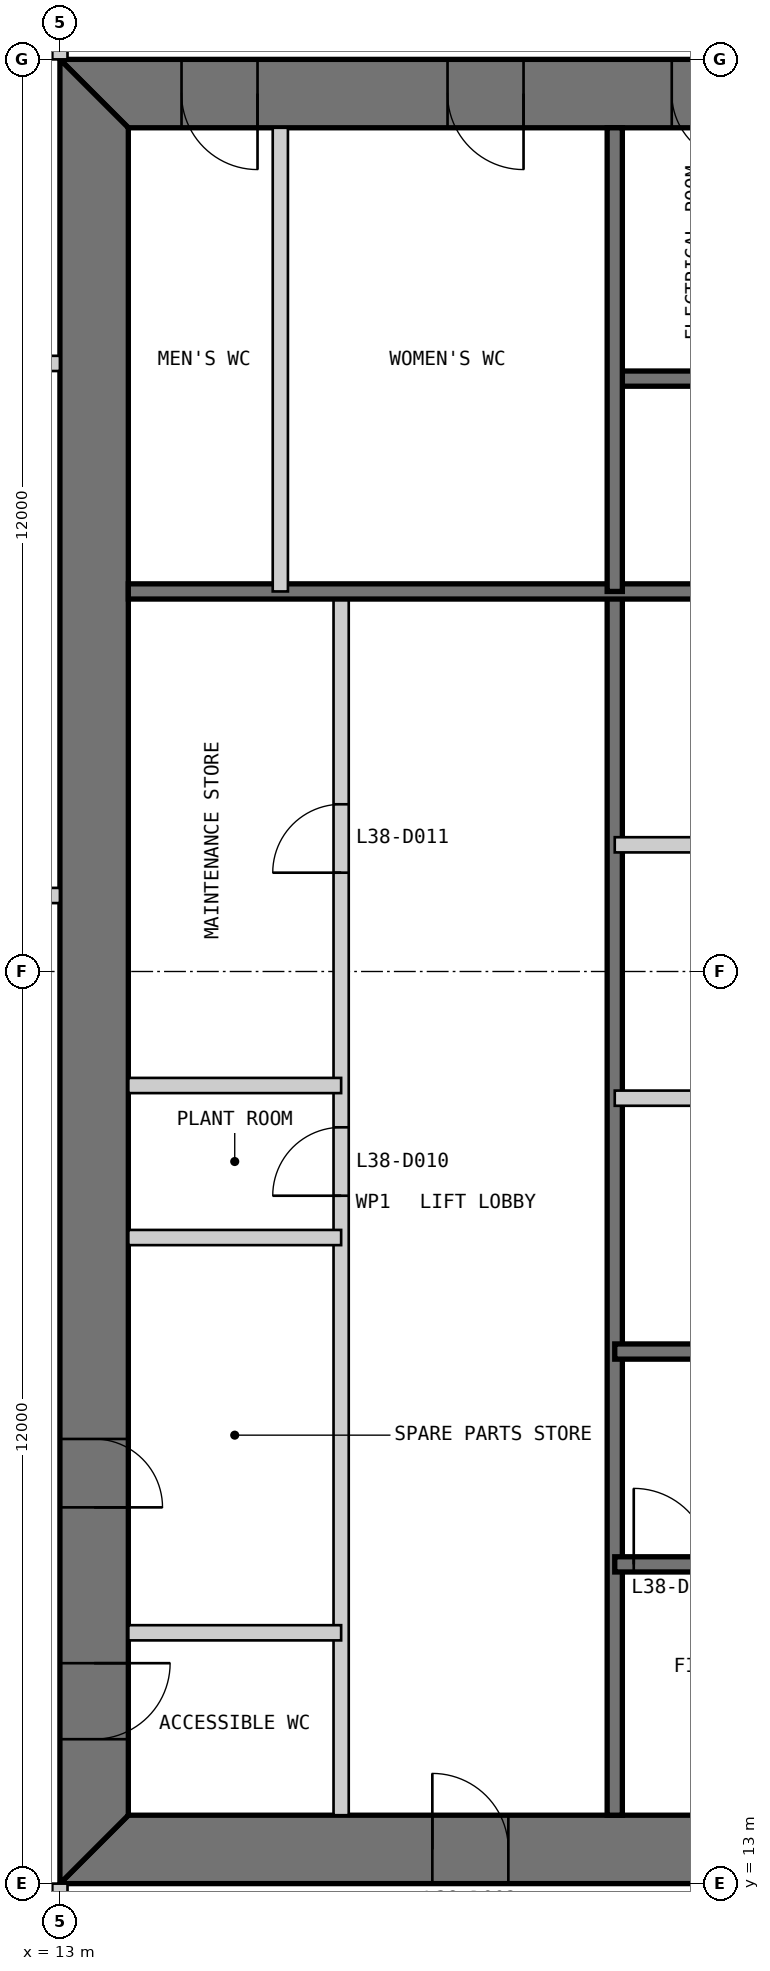
"""IFC4 building model, lengths in metres.
Left out: names, types, materials, properties, quantities, classifications, styles, units other than length and angle.
Written with IfcOpenShell. Run it as: python <this file> out.ifc"""

import sys

from ifc_helpers import new_model, si_unit, direction, frame, frame_2d, origin, place, context, subcontext, project, spatial, polyline, rectangle, outline, extrude, element, fill, save


model = new_model("IFC4")
c1 = context("Model", 3, precision=1e-05, world=origin(), true_north=direction((0.0, 1.0)))
c2 = subcontext(c1, "Body", "Model", "MODEL_VIEW")
j1 = project(units=[si_unit("LENGTHUNIT", "METRE"), si_unit("PLANEANGLEUNIT", "RADIAN")], contexts=[c1])
p1 = place(None, origin())
s1 = spatial("IfcSite", under=j1, at=p1, CompositionType="ELEMENT")
p2 = place(p1, origin())
s2 = spatial("IfcBuilding", under=s1, at=p2, CompositionType="ELEMENT")
p3 = place(p2, frame((0.0, 0.0, 162.4)))
s3 = spatial("IfcBuildingStorey", under=s2, at=p3, CompositionType="ELEMENT", Elevation=162.4)
p4 = place(p3, frame((13.0, 13.45, 0.0), z_axis=(0.0, 0.0, 1.0), x_axis=(1.0, 0.0, 0.0)))
e1 = element("IfcWall", 1, at=p4, inside=s3, PredefinedType="SHEAR", context=c2, shape_type="SweptSolid", body=[
    extrude(outline(polyline([(0.0, -0.45), (24.0, -0.45), (23.1, 0.45), (0.9, 0.45), (0.0, -0.45)])), origin(), (0.0, 0.0, 1.0), 6.0),
])
p5 = place(p4, frame((4.9, 0.0, 0.0)))
e2 = element("IfcOpeningElement", 2, at=p5, cuts=e1, PredefinedType="OPENING", context=c2, shape_type="SweptSolid", body=[
    extrude(rectangle(XDim=1.0, YDim=2.2, at=frame_2d((0.5, 1.1))), frame((0.0, 0.46, 0.0), z_axis=(0.0, -1.0, 0.0), x_axis=(1.0, 0.0, 0.0)), (0.0, 0.0, 1.0), 0.92),
])
p6 = place(p4, frame((8.9, 0.0, 0.0)))
e3 = element("IfcOpeningElement", 3, at=p6, cuts=e1, PredefinedType="OPENING", context=c2, shape_type="SweptSolid", body=[
    extrude(rectangle(XDim=1.1, YDim=2.2, at=frame_2d((0.55, 1.1))), frame((0.0, 0.46, 0.0), z_axis=(0.0, -1.0, 0.0), x_axis=(1.0, 0.0, 0.0)), (0.0, 0.0, 1.0), 0.92),
])
p7 = place(p4, frame((15.05, 0.0, 0.0)))
e4 = element("IfcOpeningElement", 4, at=p7, cuts=e1, PredefinedType="OPENING", context=c2, shape_type="SweptSolid", body=[
    extrude(rectangle(XDim=0.9, YDim=2.2, at=frame_2d((0.45, 1.1))), frame((0.0, 0.46, 0.0), z_axis=(0.0, -1.0, 0.0), x_axis=(1.0, 0.0, 0.0)), (0.0, 0.0, 1.0), 0.92),
])
p8 = place(p4, frame((17.9, 0.0, 0.0)))
e5 = element("IfcOpeningElement", 5, at=p8, cuts=e1, PredefinedType="OPENING", context=c2, shape_type="SweptSolid", body=[
    extrude(rectangle(XDim=1.0, YDim=2.2, at=frame_2d((0.5, 1.1))), frame((0.0, 0.46, 0.0), z_axis=(0.0, -1.0, 0.0), x_axis=(1.0, 0.0, 0.0)), (0.0, 0.0, 1.0), 0.92),
])
p9 = place(p4, frame((21.4, 0.0, 0.0)))
e6 = element("IfcOpeningElement", 6, at=p9, cuts=e1, PredefinedType="OPENING", context=c2, shape_type="SweptSolid", body=[
    extrude(rectangle(XDim=1.0, YDim=2.2, at=frame_2d((0.5, 1.1))), frame((0.0, 0.46, 0.0), z_axis=(0.0, -1.0, 0.0), x_axis=(1.0, 0.0, 0.0)), (0.0, 0.0, 1.0), 0.92),
])
p10 = place(p3, frame((37.0, 36.55, 0.0), z_axis=(0.0, 0.0, 1.0), x_axis=(-1.0, 0.0, 0.0)))
e7 = element("IfcWall", 7, at=p10, inside=s3, PredefinedType="SHEAR", context=c2, shape_type="SweptSolid", body=[
    extrude(outline(polyline([(0.0, -0.45), (24.0, -0.45), (23.1, 0.45), (0.9, 0.45), (0.0, -0.45)])), origin(), (0.0, 0.0, 1.0), 6.0),
])
p11 = place(p10, frame((4.9, 0.0, 0.0)))
e8 = element("IfcOpeningElement", 8, at=p11, cuts=e7, PredefinedType="OPENING", context=c2, shape_type="SweptSolid", body=[
    extrude(rectangle(XDim=1.0, YDim=2.2, at=frame_2d((0.5, 1.1))), frame((0.0, 0.46, 0.0), z_axis=(0.0, -1.0, 0.0), x_axis=(1.0, 0.0, 0.0)), (0.0, 0.0, 1.0), 0.92),
])
p12 = place(p10, frame((8.9, 0.0, 0.0)))
e9 = element("IfcOpeningElement", 9, at=p12, cuts=e7, PredefinedType="OPENING", context=c2, shape_type="SweptSolid", body=[
    extrude(rectangle(XDim=1.1, YDim=2.2, at=frame_2d((0.55, 1.1))), frame((0.0, 0.46, 0.0), z_axis=(0.0, -1.0, 0.0), x_axis=(1.0, 0.0, 0.0)), (0.0, 0.0, 1.0), 0.92),
])
p13 = place(p10, frame((15.05, 0.0, 0.0)))
e10 = element("IfcOpeningElement", 10, at=p13, cuts=e7, PredefinedType="OPENING", context=c2, shape_type="SweptSolid", body=[
    extrude(rectangle(XDim=0.9, YDim=2.2, at=frame_2d((0.45, 1.1))), frame((0.0, 0.46, 0.0), z_axis=(0.0, -1.0, 0.0), x_axis=(1.0, 0.0, 0.0)), (0.0, 0.0, 1.0), 0.92),
])
p14 = place(p10, frame((17.9, 0.0, 0.0)))
e11 = element("IfcOpeningElement", 11, at=p14, cuts=e7, PredefinedType="OPENING", context=c2, shape_type="SweptSolid", body=[
    extrude(rectangle(XDim=1.0, YDim=2.2, at=frame_2d((0.5, 1.1))), frame((0.0, 0.46, 0.0), z_axis=(0.0, -1.0, 0.0), x_axis=(1.0, 0.0, 0.0)), (0.0, 0.0, 1.0), 0.92),
])
p15 = place(p10, frame((21.4, 0.0, 0.0)))
e12 = element("IfcOpeningElement", 12, at=p15, cuts=e7, PredefinedType="OPENING", context=c2, shape_type="SweptSolid", body=[
    extrude(rectangle(XDim=1.0, YDim=2.2, at=frame_2d((0.5, 1.1))), frame((0.0, 0.46, 0.0), z_axis=(0.0, -1.0, 0.0), x_axis=(1.0, 0.0, 0.0)), (0.0, 0.0, 1.0), 0.92),
])
p16 = place(p3, frame((13.45, 36.1, 0.0), z_axis=(0.0, 0.0, 1.0), x_axis=(0.0, -1.0, 0.0)))
e13 = element("IfcWall", 13, at=p16, inside=s3, PredefinedType="SHEAR", context=c2, shape_type="SweptSolid", body=[
    extrude(outline(polyline([(-0.9, -0.45), (23.1, -0.45), (22.2, 0.45), (0.0, 0.45), (-0.9, -0.45)])), origin(), (0.0, 0.0, 1.0), 6.0),
])
p17 = place(p16, frame((20.2, 0.0, 0.0)))
e14 = element("IfcOpeningElement", 14, at=p17, cuts=e13, PredefinedType="OPENING", context=c2, shape_type="SweptSolid", body=[
    extrude(rectangle(XDim=1.0, YDim=2.2, at=frame_2d((0.5, 1.1))), frame((0.0, 0.46, 0.0), z_axis=(0.0, -1.0, 0.0), x_axis=(1.0, 0.0, 0.0)), (0.0, 0.0, 1.0), 0.92),
])
p18 = place(p16, frame((17.25, 0.0, 0.0)))
e15 = element("IfcOpeningElement", 15, at=p18, cuts=e13, PredefinedType="OPENING", context=c2, shape_type="SweptSolid", body=[
    extrude(rectangle(XDim=0.9, YDim=2.2, at=frame_2d((0.45, 1.1))), frame((0.0, 0.46, 0.0), z_axis=(0.0, -1.0, 0.0), x_axis=(1.0, 0.0, 0.0)), (0.0, 0.0, 1.0), 0.92),
])
p19 = place(p3, frame((16.7, 13.9, 0.0), z_axis=(0.0, 0.0, 1.0), x_axis=(0.0, 1.0, 0.0)))
e16 = element("IfcWall", 16, at=p19, inside=s3, PredefinedType="PARTITIONING", context=c2, shape_type="SweptSolid", body=[
    extrude(rectangle(XDim=16.1, YDim=0.2, at=frame_2d((8.05, 0.0))), origin(), (0.0, 0.0, 1.0), 5.8),
])
p20 = place(p19, frame((8.15, 0.0, 0.0)))
e17 = element("IfcOpeningElement", 17, at=p20, cuts=e16, PredefinedType="OPENING", context=c2, shape_type="SweptSolid", body=[
    extrude(rectangle(XDim=0.9, YDim=2.2, at=frame_2d((0.45, 1.1))), frame((0.0, 0.11, 0.0), z_axis=(0.0, -1.0, 0.0), x_axis=(1.0, 0.0, 0.0)), (0.0, 0.0, 1.0), 0.22),
])
p21 = place(p19, frame((12.4, 0.0, 0.0)))
e18 = element("IfcOpeningElement", 18, at=p21, cuts=e16, PredefinedType="OPENING", context=c2, shape_type="SweptSolid", body=[
    extrude(rectangle(XDim=0.9, YDim=2.2, at=frame_2d((0.45, 1.1))), frame((0.0, 0.11, 0.0), z_axis=(0.0, -1.0, 0.0), x_axis=(1.0, 0.0, 0.0)), (0.0, 0.0, 1.0), 0.22),
])
p22 = place(p3, frame((20.3, 13.9, 0.0), z_axis=(0.0, 0.0, 1.0), x_axis=(0.0, 1.0, 0.0)))
e19 = element("IfcWall", 19, at=p22, inside=s3, PredefinedType="SOLIDWALL", context=c2, shape_type="SweptSolid", body=[
    extrude(rectangle(XDim=16.1, YDim=0.2, at=frame_2d((8.05, 0.0))), origin(), (0.0, 0.0, 1.0), 5.8),
])
for number, where, z_axis, x_axis in (
    (20, (20.3, 23.333, 0.0), (0.0, 0.0, 1.0), (1.0, 0.0, 0.0)),
    (21, (20.3, 26.667, 0.0), (0.0, 0.0, 1.0), (1.0, 0.0, 0.0)),
):
    element("IfcWall", number, at=place(p3, frame(where, z_axis=z_axis, x_axis=x_axis)), inside=s3, PredefinedType="PARTITIONING", context=c2, shape_type="SweptSolid", body=[
        extrude(rectangle(XDim=2.8, YDim=0.2, at=frame_2d((1.4, 0.0))), origin(), (0.0, 0.0, 1.0), 5.8),
    ])
p23 = place(p3, frame((20.3, 17.2, 0.0), z_axis=(0.0, 0.0, 1.0), x_axis=(1.0, 0.0, 0.0)))
e22 = element("IfcWall", 22, at=p23, inside=s3, PredefinedType="SOLIDWALL", context=c2, shape_type="SweptSolid", body=[
    extrude(rectangle(XDim=9.4, YDim=0.2, at=frame_2d((4.7, 0.0))), origin(), (0.0, 0.0, 1.0), 5.8),
])
p24 = place(p23, frame((0.25, 0.0, 0.0)))
e23 = element("IfcOpeningElement", 23, at=p24, cuts=e22, PredefinedType="OPENING", context=c2, shape_type="SweptSolid", body=[
    extrude(rectangle(XDim=1.0, YDim=2.2, at=frame_2d((0.5, 1.1))), frame((0.0, 0.11, 0.0), z_axis=(0.0, -1.0, 0.0), x_axis=(1.0, 0.0, 0.0)), (0.0, 0.0, 1.0), 0.22),
])
p25 = place(p3, frame((20.3, 20.0, 0.0), z_axis=(0.0, 0.0, 1.0), x_axis=(1.0, 0.0, 0.0)))
e24 = element("IfcWall", 24, at=p25, inside=s3, PredefinedType="SOLIDWALL", context=c2, shape_type="SweptSolid", body=[
    extrude(rectangle(XDim=15.8, YDim=0.2, at=frame_2d((7.9, 0.0))), origin(), (0.0, 0.0, 1.0), 5.8),
])
for number, where, z_axis, x_axis in (
    (25, (13.9, 16.3, 0.0), (0.0, 0.0, 1.0), (1.0, 0.0, 0.0)),
    (26, (13.9, 21.5, 0.0), (0.0, 0.0, 1.0), (1.0, 0.0, 0.0)),
    (27, (13.9, 23.5, 0.0), (0.0, 0.0, 1.0), (1.0, 0.0, 0.0)),
):
    element("IfcWall", number, at=place(p3, frame(where, z_axis=z_axis, x_axis=x_axis)), inside=s3, PredefinedType="PARTITIONING", context=c2, shape_type="SweptSolid", body=[
        extrude(rectangle(XDim=2.8, YDim=0.2, at=frame_2d((1.4, 0.0))), origin(), (0.0, 0.0, 1.0), 5.8),
    ])
p26 = place(p3, frame((29.7, 32.8, 0.0), z_axis=(0.0, 0.0, 1.0), x_axis=(-1.0, 0.0, 0.0)))
e28 = element("IfcWall", 28, at=p26, inside=s3, PredefinedType="SOLIDWALL", context=c2, shape_type="SweptSolid", body=[
    extrude(rectangle(XDim=9.4, YDim=0.2, at=frame_2d((4.7, 0.0))), origin(), (0.0, 0.0, 1.0), 5.8),
])
p27 = place(p26, frame((0.25, 0.0, 0.0)))
e29 = element("IfcOpeningElement", 29, at=p27, cuts=e28, PredefinedType="OPENING", context=c2, shape_type="SweptSolid", body=[
    extrude(rectangle(XDim=1.0, YDim=2.2, at=frame_2d((0.5, 1.1))), frame((0.0, 0.11, 0.0), z_axis=(0.0, -1.0, 0.0), x_axis=(1.0, 0.0, 0.0)), (0.0, 0.0, 1.0), 0.22),
])
p28 = place(p3, frame((29.7, 30.0, 0.0), z_axis=(0.0, 0.0, 1.0), x_axis=(-1.0, 0.0, 0.0)))
e30 = element("IfcWall", 30, at=p28, inside=s3, PredefinedType="SOLIDWALL", context=c2, shape_type="SweptSolid", body=[
    extrude(rectangle(XDim=15.8, YDim=0.2, at=frame_2d((7.9, 0.0))), origin(), (0.0, 0.0, 1.0), 5.8),
])
p29 = place(p3, frame((20.3, 36.1, 0.0), z_axis=(0.0, 0.0, 1.0), x_axis=(0.0, -1.0, 0.0)))
e31 = element("IfcWall", 31, at=p29, inside=s3, PredefinedType="SOLIDWALL", context=c2, shape_type="SweptSolid", body=[
    extrude(rectangle(XDim=6.1, YDim=0.2, at=frame_2d((3.05, 0.0))), origin(), (0.0, 0.0, 1.0), 5.8),
])
p30 = place(p3, frame((15.9, 36.1, 0.0), z_axis=(0.0, 0.0, 1.0), x_axis=(0.0, -1.0, 0.0)))
e32 = element("IfcWall", 32, at=p30, inside=s3, PredefinedType="PARTITIONING", context=c2, shape_type="SweptSolid", body=[
    extrude(rectangle(XDim=6.1, YDim=0.2, at=frame_2d((3.05, 0.0))), origin(), (0.0, 0.0, 1.0), 5.8),
])
p31 = place(p3, frame((13.0, 37.0, 0.0), z_axis=(0.0, 0.0, 1.0), x_axis=(0.0, 1.0, 0.0)))
e33 = element("IfcWall", 33, at=p31, inside=s3, PredefinedType="PARTITIONING", context=c2, shape_type="SweptSolid", body=[
    extrude(rectangle(XDim=7.0, YDim=0.2, at=frame_2d((3.5, 0.0))), origin(), (0.0, 0.0, 1.0), 4.807),
])
p32 = place(p3, frame((13.0, 10.6, 0.0), z_axis=(0.0, 0.0, 1.0), x_axis=(0.0, 1.0, 0.0)))
e34 = element("IfcWall", 34, at=p32, inside=s3, PredefinedType="PARTITIONING", context=c2, shape_type="SweptSolid", body=[
    extrude(rectangle(XDim=2.4, YDim=0.2, at=frame_2d((1.2, 0.0))), origin(), (0.0, 0.0, 1.0), 4.807),
])
p33 = place(p3, frame((2.0, 26.0, 0.0), z_axis=(0.0, 0.0, 1.0), x_axis=(1.0, 0.0, 0.0)))
e35 = element("IfcWall", 35, at=p33, inside=s3, PredefinedType="PARTITIONING", context=c2, shape_type="SweptSolid", body=[
    extrude(rectangle(XDim=11.0, YDim=0.2, at=frame_2d((5.5, 0.0))), origin(), (0.0, 0.0, 1.0), 5.8),
])
p34 = place(p33, frame((4.6, 0.0, 0.0)))
e36 = element("IfcOpeningElement", 36, at=p34, cuts=e35, PredefinedType="OPENING", context=c2, shape_type="SweptSolid", body=[
    extrude(rectangle(XDim=1.8, YDim=2.4, at=frame_2d((0.9, 1.2))), frame((0.0, 0.11, 0.0), z_axis=(0.0, -1.0, 0.0), x_axis=(1.0, 0.0, 0.0)), (0.0, 0.0, 1.0), 0.22),
])
p35 = place(p3, frame((2.0, 33.0, 0.0), z_axis=(0.0, 0.0, 1.0), x_axis=(1.0, 0.0, 0.0)))
e37 = element("IfcWall", 37, at=p35, inside=s3, PredefinedType="PARTITIONING", context=c2, shape_type="SweptSolid", body=[
    extrude(rectangle(XDim=11.0, YDim=0.2, at=frame_2d((5.5, 0.0))), origin(), (0.0, 0.0, 1.0), 5.8),
])
p36 = place(p35, frame((4.6, 0.0, 0.0)))
e38 = element("IfcOpeningElement", 38, at=p36, cuts=e37, PredefinedType="OPENING", context=c2, shape_type="SweptSolid", body=[
    extrude(rectangle(XDim=1.8, YDim=2.4, at=frame_2d((0.9, 1.2))), frame((0.0, 0.11, 0.0), z_axis=(0.0, -1.0, 0.0), x_axis=(1.0, 0.0, 0.0)), (0.0, 0.0, 1.0), 0.22),
])
p37 = place(p5, origin())
e39 = element("IfcDoor", 39, at=p37, inside=s3, OperationType="SINGLE_SWING_LEFT", PredefinedType="DOOR", context=c2, shape_type="SweptSolid", body=[
    extrude(rectangle(XDim=1.0, YDim=2.2, at=frame_2d((0.5, 1.1))), frame((0.0, 0.025, 0.0), z_axis=(0.0, -1.0, 0.0), x_axis=(1.0, 0.0, 0.0)), (0.0, 0.0, 1.0), 0.05),
    extrude(outline(polyline([(0.0, 0.0), (0.04, 0.0), (0.04, 2.16), (0.96, 2.16), (0.96, 0.0), (1.0, 0.0), (1.0, 2.2), (0.0, 2.2), (0.0, 0.0)])), frame((0.0, 0.3, 0.0), z_axis=(0.0, -1.0, 0.0), x_axis=(1.0, 0.0, 0.0)), (0.0, 0.0, 1.0), 0.6),
])
fill(e2, e39)
p38 = place(p24, origin())
e40 = element("IfcDoor", 40, at=p38, inside=s3, OperationType="SINGLE_SWING_LEFT", PredefinedType="DOOR", context=c2, shape_type="SweptSolid", body=[
    extrude(rectangle(XDim=1.0, YDim=2.2, at=frame_2d((0.5, 1.1))), frame((0.0, 0.025, 0.0), z_axis=(0.0, -1.0, 0.0), x_axis=(1.0, 0.0, 0.0)), (0.0, 0.0, 1.0), 0.05),
])
fill(e23, e40)
p39 = place(p17, origin())
e41 = element("IfcDoor", 41, at=p39, inside=s3, OperationType="SINGLE_SWING_LEFT", PredefinedType="DOOR", context=c2, shape_type="SweptSolid", body=[
    extrude(rectangle(XDim=1.0, YDim=2.2, at=frame_2d((0.5, 1.1))), frame((0.0, 0.025, 0.0), z_axis=(0.0, -1.0, 0.0), x_axis=(1.0, 0.0, 0.0)), (0.0, 0.0, 1.0), 0.05),
    extrude(outline(polyline([(0.0, 0.0), (0.04, 0.0), (0.04, 2.16), (0.96, 2.16), (0.96, 0.0), (1.0, 0.0), (1.0, 2.2), (0.0, 2.2), (0.0, 0.0)])), frame((0.0, 0.3, 0.0), z_axis=(0.0, -1.0, 0.0), x_axis=(1.0, 0.0, 0.0)), (0.0, 0.0, 1.0), 0.6),
])
fill(e14, e41)
p40 = place(p18, origin())
e42 = element("IfcDoor", 42, at=p40, inside=s3, OperationType="SINGLE_SWING_RIGHT", PredefinedType="DOOR", context=c2, shape_type="SweptSolid", body=[
    extrude(rectangle(XDim=0.9, YDim=2.2, at=frame_2d((0.45, 1.1))), frame((0.0, 0.025, 0.0), z_axis=(0.0, -1.0, 0.0), x_axis=(1.0, 0.0, 0.0)), (0.0, 0.0, 1.0), 0.05),
    extrude(outline(polyline([(0.0, 0.0), (0.04, 0.0), (0.04, 2.16), (0.86, 2.16), (0.86, 0.0), (0.9, 0.0), (0.9, 2.2), (0.0, 2.2), (0.0, 0.0)])), frame((0.0, 0.3, 0.0), z_axis=(0.0, -1.0, 0.0), x_axis=(1.0, 0.0, 0.0)), (0.0, 0.0, 1.0), 0.6),
])
fill(e15, e42)
p41 = place(p20, origin())
e43 = element("IfcDoor", 43, at=p41, inside=s3, OperationType="SINGLE_SWING_LEFT", PredefinedType="DOOR", context=c2, shape_type="SweptSolid", body=[
    extrude(rectangle(XDim=0.9, YDim=2.2, at=frame_2d((0.45, 1.1))), frame((0.0, 0.025, 0.0), z_axis=(0.0, -1.0, 0.0), x_axis=(1.0, 0.0, 0.0)), (0.0, 0.0, 1.0), 0.05),
])
fill(e17, e43)
p42 = place(p21, origin())
e44 = element("IfcDoor", 44, at=p42, inside=s3, OperationType="SINGLE_SWING_LEFT", PredefinedType="DOOR", context=c2, shape_type="SweptSolid", body=[
    extrude(rectangle(XDim=0.9, YDim=2.2, at=frame_2d((0.45, 1.1))), frame((0.0, 0.025, 0.0), z_axis=(0.0, -1.0, 0.0), x_axis=(1.0, 0.0, 0.0)), (0.0, 0.0, 1.0), 0.05),
])
fill(e18, e44)
p43 = place(p13, origin())
e45 = element("IfcDoor", 45, at=p43, inside=s3, OperationType="SINGLE_SWING_LEFT", PredefinedType="DOOR", context=c2, shape_type="SweptSolid", body=[
    extrude(rectangle(XDim=0.9, YDim=2.2, at=frame_2d((0.45, 1.1))), frame((0.0, 0.025, 0.0), z_axis=(0.0, -1.0, 0.0), x_axis=(1.0, 0.0, 0.0)), (0.0, 0.0, 1.0), 0.05),
    extrude(outline(polyline([(0.0, 0.0), (0.04, 0.0), (0.04, 2.16), (0.86, 2.16), (0.86, 0.0), (0.9, 0.0), (0.9, 2.2), (0.0, 2.2), (0.0, 0.0)])), frame((0.0, 0.3, 0.0), z_axis=(0.0, -1.0, 0.0), x_axis=(1.0, 0.0, 0.0)), (0.0, 0.0, 1.0), 0.6),
])
fill(e10, e45)
p44 = place(p14, origin())
e46 = element("IfcDoor", 46, at=p44, inside=s3, OperationType="SINGLE_SWING_LEFT", PredefinedType="DOOR", context=c2, shape_type="SweptSolid", body=[
    extrude(rectangle(XDim=1.0, YDim=2.2, at=frame_2d((0.5, 1.1))), frame((0.0, 0.025, 0.0), z_axis=(0.0, -1.0, 0.0), x_axis=(1.0, 0.0, 0.0)), (0.0, 0.0, 1.0), 0.05),
    extrude(outline(polyline([(0.0, 0.0), (0.04, 0.0), (0.04, 2.16), (0.96, 2.16), (0.96, 0.0), (1.0, 0.0), (1.0, 2.2), (0.0, 2.2), (0.0, 0.0)])), frame((0.0, 0.3, 0.0), z_axis=(0.0, -1.0, 0.0), x_axis=(1.0, 0.0, 0.0)), (0.0, 0.0, 1.0), 0.6),
])
fill(e11, e46)
p45 = place(p15, origin())
e47 = element("IfcDoor", 47, at=p45, inside=s3, OperationType="SINGLE_SWING_LEFT", PredefinedType="DOOR", context=c2, shape_type="SweptSolid", body=[
    extrude(rectangle(XDim=1.0, YDim=2.2, at=frame_2d((0.5, 1.1))), frame((0.0, 0.025, 0.0), z_axis=(0.0, -1.0, 0.0), x_axis=(1.0, 0.0, 0.0)), (0.0, 0.0, 1.0), 0.05),
    extrude(outline(polyline([(0.0, 0.0), (0.04, 0.0), (0.04, 2.16), (0.96, 2.16), (0.96, 0.0), (1.0, 0.0), (1.0, 2.2), (0.0, 2.2), (0.0, 0.0)])), frame((0.0, 0.3, 0.0), z_axis=(0.0, -1.0, 0.0), x_axis=(1.0, 0.0, 0.0)), (0.0, 0.0, 1.0), 0.6),
])
fill(e12, e47)
save(model, sys.argv[1])
